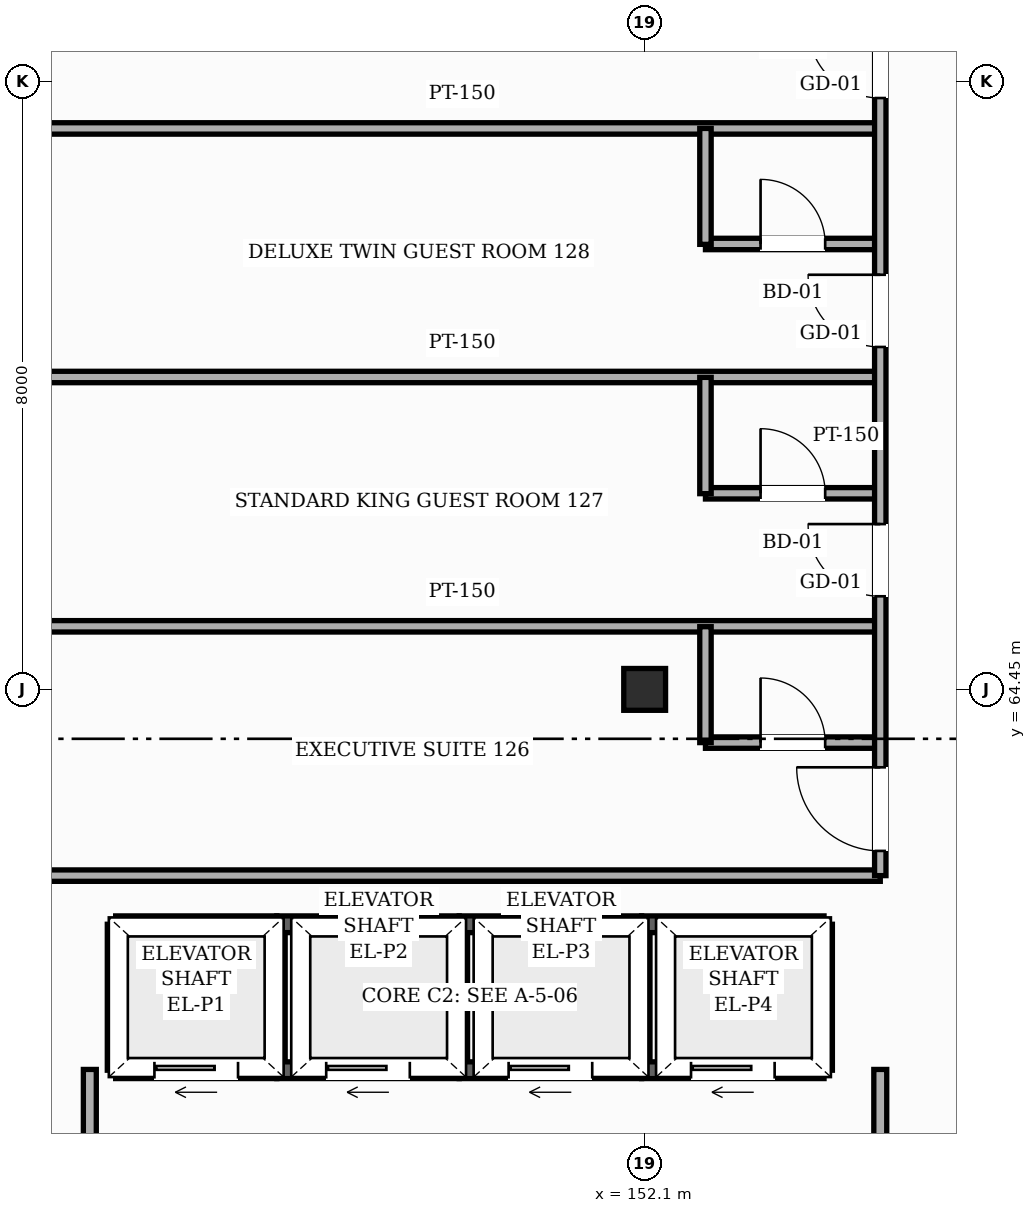
"""IFC4 building model, lengths in metres.
Left out: names, types, materials, properties, quantities, classifications, styles, units other than length and angle.
Written with IfcOpenShell. Run it as: python <this file> out.ifc"""

import sys

from ifc_helpers import new_model, si_unit, direction, frame, frame_2d, origin, origin_2d, place, context, subcontext, project, spatial, rectangle, hollow_rectangle, extrude, element, fill, save


model = new_model("IFC4")
c1 = context("Model", 3, precision=1e-05, world=origin(), true_north=direction((0.0, 1.0)))
c2 = subcontext(c1, "Body", "Model", "MODEL_VIEW")
j1 = project(units=[si_unit("LENGTHUNIT", "METRE"), si_unit("PLANEANGLEUNIT", "RADIAN")], contexts=[c1])
p1 = place(None, origin())
s1 = spatial("IfcSite", under=j1, at=p1, CompositionType="ELEMENT")
p2 = place(p1, origin())
s2 = spatial("IfcBuilding", under=s1, at=p2, CompositionType="ELEMENT")
p3 = place(p2, frame((0.0, 0.0, 28.2)))
s3 = spatial("IfcBuildingStorey", under=s2, at=p3, CompositionType="ELEMENT", Elevation=28.2)
p4 = place(p3, frame((152.1, 64.45, 0.0), z_axis=(0.0, 0.0, 1.0), x_axis=(1.0, 0.0, 0.0)))
e1 = element("IfcColumn", 1, at=p4, inside=s3, PredefinedType="COLUMN", context=c2, shape_type="SweptSolid", body=[
    extrude(hollow_rectangle(XDim=0.55, YDim=0.55, WallThickness=0.022, InnerFilletRadius=0.022, OuterFilletRadius=0.044, at=origin_2d()), origin(), (0.0, 0.0, 1.0), 3.6),
])
p5 = place(p3, frame((145.14, 61.36, 0.0), z_axis=(0.0, 0.0, 1.0), x_axis=(1.0, 0.0, 0.0)))
e2 = element("IfcWall", 2, at=p5, inside=s3, PredefinedType="SHEAR", context=c2, shape_type="SweptSolid", body=[
    extrude(rectangle(XDim=2.12, YDim=0.22, at=frame_2d((1.06, 0.0))), origin(), (0.0, 0.0, 1.0), 3.38),
])
p6 = place(p3, frame((145.14, 59.44, 0.0), z_axis=(0.0, 0.0, 1.0), x_axis=(1.0, 0.0, 0.0)))
e3 = element("IfcWall", 3, at=p6, inside=s3, PredefinedType="SHEAR", context=c2, shape_type="SweptSolid", body=[
    extrude(rectangle(XDim=2.12, YDim=0.22, at=frame_2d((1.06, 0.0))), origin(), (0.0, 0.0, 1.0), 3.38),
])
p7 = place(p6, frame((0.51, 0.0, 0.0)))
e4 = element("IfcOpeningElement", 4, at=p7, cuts=e3, PredefinedType="OPENING", context=c2, shape_type="SweptSolid", body=[
    extrude(rectangle(XDim=1.1, YDim=2.2, at=frame_2d((0.55, 1.1))), frame((0.0, 0.12, 0.0), z_axis=(0.0, -1.0, 0.0), x_axis=(1.0, 0.0, 0.0)), (0.0, 0.0, 1.0), 0.24),
])
for number, where, z_axis, x_axis in (
    (5, (147.26, 59.44, 0.0), (0.0, 0.0, 1.0), (0.0, 1.0, 0.0)),
    (6, (145.14, 59.44, 0.0), (0.0, 0.0, 1.0), (0.0, 1.0, 0.0)),
):
    element("IfcWall", number, at=place(p3, frame(where, z_axis=z_axis, x_axis=x_axis)), inside=s3, PredefinedType="SHEAR", context=c2, shape_type="SweptSolid", body=[
        extrude(rectangle(XDim=1.92, YDim=0.22, at=frame_2d((0.96, 0.0))), origin(), (0.0, 0.0, 1.0), 3.38),
    ])
p8 = place(p3, frame((147.26, 61.36, 0.0), z_axis=(0.0, 0.0, 1.0), x_axis=(1.0, 0.0, 0.0)))
e7 = element("IfcWall", 7, at=p8, inside=s3, PredefinedType="SHEAR", context=c2, shape_type="SweptSolid", body=[
    extrude(rectangle(XDim=2.4, YDim=0.22, at=frame_2d((1.2, 0.0))), origin(), (0.0, 0.0, 1.0), 3.38),
])
p9 = place(p3, frame((147.26, 59.44, 0.0), z_axis=(0.0, 0.0, 1.0), x_axis=(1.0, 0.0, 0.0)))
e8 = element("IfcWall", 8, at=p9, inside=s3, PredefinedType="SHEAR", context=c2, shape_type="SweptSolid", body=[
    extrude(rectangle(XDim=2.4, YDim=0.22, at=frame_2d((1.2, 0.0))), origin(), (0.0, 0.0, 1.0), 3.38),
])
p10 = place(p9, frame((0.65, 0.0, 0.0)))
e9 = element("IfcOpeningElement", 9, at=p10, cuts=e8, PredefinedType="OPENING", context=c2, shape_type="SweptSolid", body=[
    extrude(rectangle(XDim=1.1, YDim=2.2, at=frame_2d((0.55, 1.1))), frame((0.0, 0.12, 0.0), z_axis=(0.0, -1.0, 0.0), x_axis=(1.0, 0.0, 0.0)), (0.0, 0.0, 1.0), 0.24),
])
p11 = place(p3, frame((149.66, 59.44, 0.0), z_axis=(0.0, 0.0, 1.0), x_axis=(0.0, 1.0, 0.0)))
e10 = element("IfcWall", 10, at=p11, inside=s3, PredefinedType="SHEAR", context=c2, shape_type="SweptSolid", body=[
    extrude(rectangle(XDim=1.92, YDim=0.22, at=frame_2d((0.96, 0.0))), origin(), (0.0, 0.0, 1.0), 3.38),
])
p12 = place(p3, frame((149.66, 61.36, 0.0), z_axis=(0.0, 0.0, 1.0), x_axis=(1.0, 0.0, 0.0)))
e11 = element("IfcWall", 11, at=p12, inside=s3, PredefinedType="SHEAR", context=c2, shape_type="SweptSolid", body=[
    extrude(rectangle(XDim=2.4, YDim=0.22, at=frame_2d((1.2, 0.0))), origin(), (0.0, 0.0, 1.0), 3.38),
])
p13 = place(p3, frame((149.66, 59.44, 0.0), z_axis=(0.0, 0.0, 1.0), x_axis=(1.0, 0.0, 0.0)))
e12 = element("IfcWall", 12, at=p13, inside=s3, PredefinedType="SHEAR", context=c2, shape_type="SweptSolid", body=[
    extrude(rectangle(XDim=2.4, YDim=0.22, at=frame_2d((1.2, 0.0))), origin(), (0.0, 0.0, 1.0), 3.38),
])
p14 = place(p13, frame((0.65, 0.0, 0.0)))
e13 = element("IfcOpeningElement", 13, at=p14, cuts=e12, PredefinedType="OPENING", context=c2, shape_type="SweptSolid", body=[
    extrude(rectangle(XDim=1.1, YDim=2.2, at=frame_2d((0.55, 1.1))), frame((0.0, 0.12, 0.0), z_axis=(0.0, -1.0, 0.0), x_axis=(1.0, 0.0, 0.0)), (0.0, 0.0, 1.0), 0.24),
])
p15 = place(p3, frame((152.06, 59.44, 0.0), z_axis=(0.0, 0.0, 1.0), x_axis=(0.0, 1.0, 0.0)))
e14 = element("IfcWall", 14, at=p15, inside=s3, PredefinedType="SHEAR", context=c2, shape_type="SweptSolid", body=[
    extrude(rectangle(XDim=1.92, YDim=0.22, at=frame_2d((0.96, 0.0))), origin(), (0.0, 0.0, 1.0), 3.38),
])
p16 = place(p3, frame((152.06, 61.36, 0.0), z_axis=(0.0, 0.0, 1.0), x_axis=(1.0, 0.0, 0.0)))
e15 = element("IfcWall", 15, at=p16, inside=s3, PredefinedType="SHEAR", context=c2, shape_type="SweptSolid", body=[
    extrude(rectangle(XDim=2.4, YDim=0.22, at=frame_2d((1.2, 0.0))), origin(), (0.0, 0.0, 1.0), 3.38),
])
p17 = place(p3, frame((152.06, 59.44, 0.0), z_axis=(0.0, 0.0, 1.0), x_axis=(1.0, 0.0, 0.0)))
e16 = element("IfcWall", 16, at=p17, inside=s3, PredefinedType="SHEAR", context=c2, shape_type="SweptSolid", body=[
    extrude(rectangle(XDim=2.4, YDim=0.22, at=frame_2d((1.2, 0.0))), origin(), (0.0, 0.0, 1.0), 3.38),
])
p18 = place(p17, frame((0.65, 0.0, 0.0)))
e17 = element("IfcOpeningElement", 17, at=p18, cuts=e16, PredefinedType="OPENING", context=c2, shape_type="SweptSolid", body=[
    extrude(rectangle(XDim=1.1, YDim=2.2, at=frame_2d((0.55, 1.1))), frame((0.0, 0.12, 0.0), z_axis=(0.0, -1.0, 0.0), x_axis=(1.0, 0.0, 0.0)), (0.0, 0.0, 1.0), 0.24),
])
p19 = place(p3, frame((154.46, 59.44, 0.0), z_axis=(0.0, 0.0, 1.0), x_axis=(0.0, 1.0, 0.0)))
e18 = element("IfcWall", 18, at=p19, inside=s3, PredefinedType="SHEAR", context=c2, shape_type="SweptSolid", body=[
    extrude(rectangle(XDim=1.92, YDim=0.22, at=frame_2d((0.96, 0.0))), origin(), (0.0, 0.0, 1.0), 3.38),
])
p20 = place(p3, frame((144.2, 62.0, 0.0), z_axis=(0.0, 0.0, 1.0), x_axis=(1.0, 0.0, 0.0)))
e19 = element("IfcWall", 19, at=p20, inside=s3, PredefinedType="PARTITIONING", context=c2, shape_type="SweptSolid", body=[
    extrude(rectangle(XDim=11.0, YDim=0.15, at=frame_2d((5.5, 0.0))), origin(), (0.0, 0.0, 1.0), 3.365),
])
p21 = place(p3, frame((152.9, 63.75, 0.0), z_axis=(0.0, 0.0, 1.0), x_axis=(1.0, 0.0, 0.0)))
e20 = element("IfcWall", 20, at=p21, inside=s3, PredefinedType="PARTITIONING", context=c2, shape_type="SweptSolid", body=[
    extrude(rectangle(XDim=2.3, YDim=0.15, at=frame_2d((1.15, 0.0))), origin(), (0.0, 0.0, 1.0), 3.365),
])
p22 = place(p21, frame((0.725, 0.0, 0.0)))
e21 = element("IfcOpeningElement", 21, at=p22, cuts=e20, PredefinedType="OPENING", context=c2, shape_type="SweptSolid", body=[
    extrude(rectangle(XDim=0.85, YDim=2.1, at=frame_2d((0.425, 1.05))), frame((0.0, 0.085, 0.0), z_axis=(0.0, -1.0, 0.0), x_axis=(1.0, 0.0, 0.0)), (0.0, 0.0, 1.0), 0.17),
])
p23 = place(p3, frame((144.2, 65.28, 0.0), z_axis=(0.0, 0.0, 1.0), x_axis=(1.0, 0.0, 0.0)))
e22 = element("IfcWall", 22, at=p23, inside=s3, PredefinedType="PARTITIONING", context=c2, shape_type="SweptSolid", body=[
    extrude(rectangle(XDim=11.0, YDim=0.15, at=frame_2d((5.5, 0.0))), origin(), (0.0, 0.0, 1.0), 3.365),
])
p24 = place(p3, frame((152.9, 67.03, 0.0), z_axis=(0.0, 0.0, 1.0), x_axis=(1.0, 0.0, 0.0)))
e23 = element("IfcWall", 23, at=p24, inside=s3, PredefinedType="PARTITIONING", context=c2, shape_type="SweptSolid", body=[
    extrude(rectangle(XDim=2.3, YDim=0.15, at=frame_2d((1.15, 0.0))), origin(), (0.0, 0.0, 1.0), 3.365),
])
p25 = place(p24, frame((0.725, 0.0, 0.0)))
e24 = element("IfcOpeningElement", 24, at=p25, cuts=e23, PredefinedType="OPENING", context=c2, shape_type="SweptSolid", body=[
    extrude(rectangle(XDim=0.85, YDim=2.1, at=frame_2d((0.425, 1.05))), frame((0.0, 0.085, 0.0), z_axis=(0.0, -1.0, 0.0), x_axis=(1.0, 0.0, 0.0)), (0.0, 0.0, 1.0), 0.17),
])
p26 = place(p3, frame((144.2, 68.56, 0.0), z_axis=(0.0, 0.0, 1.0), x_axis=(1.0, 0.0, 0.0)))
e25 = element("IfcWall", 25, at=p26, inside=s3, PredefinedType="PARTITIONING", context=c2, shape_type="SweptSolid", body=[
    extrude(rectangle(XDim=11.0, YDim=0.15, at=frame_2d((5.5, 0.0))), origin(), (0.0, 0.0, 1.0), 3.365),
])
p27 = place(p3, frame((152.9, 70.31, 0.0), z_axis=(0.0, 0.0, 1.0), x_axis=(1.0, 0.0, 0.0)))
e26 = element("IfcWall", 26, at=p27, inside=s3, PredefinedType="PARTITIONING", context=c2, shape_type="SweptSolid", body=[
    extrude(rectangle(XDim=2.3, YDim=0.15, at=frame_2d((1.15, 0.0))), origin(), (0.0, 0.0, 1.0), 3.365),
])
p28 = place(p27, frame((0.725, 0.0, 0.0)))
e27 = element("IfcOpeningElement", 27, at=p28, cuts=e26, PredefinedType="OPENING", context=c2, shape_type="SweptSolid", body=[
    extrude(rectangle(XDim=0.85, YDim=2.1, at=frame_2d((0.425, 1.05))), frame((0.0, 0.085, 0.0), z_axis=(0.0, -1.0, 0.0), x_axis=(1.0, 0.0, 0.0)), (0.0, 0.0, 1.0), 0.17),
])
p29 = place(p3, frame((144.2, 71.83, 0.0), z_axis=(0.0, 0.0, 1.0), x_axis=(1.0, 0.0, 0.0)))
e28 = element("IfcWall", 28, at=p29, inside=s3, PredefinedType="PARTITIONING", context=c2, shape_type="SweptSolid", body=[
    extrude(rectangle(XDim=11.0, YDim=0.15, at=frame_2d((5.5, 0.0))), origin(), (0.0, 0.0, 1.0), 3.365),
])
p30 = place(p3, frame((144.8, 53.0, 0.0), z_axis=(0.0, 0.0, 1.0), x_axis=(0.0, 1.0, 0.0)))
e29 = element("IfcWall", 29, at=p30, inside=s3, PredefinedType="PARTITIONING", context=c2, shape_type="SweptSolid", body=[
    extrude(rectangle(XDim=6.45, YDim=0.17, at=frame_2d((3.225, 0.0))), origin(), (0.0, 0.0, 1.0), 3.365),
])
p31 = place(p3, frame((152.9, 63.75, 0.0), z_axis=(0.0, 0.0, 1.0), x_axis=(0.0, 1.0, 0.0)))
e30 = element("IfcWall", 30, at=p31, inside=s3, PredefinedType="PARTITIONING", context=c2, shape_type="SweptSolid", body=[
    extrude(rectangle(XDim=1.525, YDim=0.15, at=frame_2d((0.762, 0.0))), origin(), (0.0, 0.0, 1.0), 3.365),
])
p32 = place(p3, frame((152.9, 67.025, 0.0), z_axis=(0.0, 0.0, 1.0), x_axis=(0.0, 1.0, 0.0)))
e31 = element("IfcWall", 31, at=p32, inside=s3, PredefinedType="PARTITIONING", context=c2, shape_type="SweptSolid", body=[
    extrude(rectangle(XDim=1.53, YDim=0.15, at=frame_2d((0.765, 0.0))), origin(), (0.0, 0.0, 1.0), 3.365),
])
p33 = place(p3, frame((152.9, 70.305, 0.0), z_axis=(0.0, 0.0, 1.0), x_axis=(0.0, 1.0, 0.0)))
e32 = element("IfcWall", 32, at=p33, inside=s3, PredefinedType="PARTITIONING", context=c2, shape_type="SweptSolid", body=[
    extrude(rectangle(XDim=1.525, YDim=0.15, at=frame_2d((0.763, 0.0))), origin(), (0.0, 0.0, 1.0), 3.365),
])
p34 = place(p3, frame((155.2, 53.0, 0.0), z_axis=(0.0, 0.0, 1.0), x_axis=(0.0, 1.0, 0.0)))
e33 = element("IfcWall", 33, at=p34, inside=s3, PredefinedType="PARTITIONING", context=c2, shape_type="SweptSolid", body=[
    extrude(rectangle(XDim=6.45, YDim=0.17, at=frame_2d((3.225, 0.0))), origin(), (0.0, 0.0, 1.0), 3.365),
])
p35 = place(p34, frame((2.625, 0.0, 0.0)))
e34 = element("IfcOpeningElement", 34, at=p35, cuts=e33, PredefinedType="OPENING", context=c2, shape_type="SweptSolid", body=[
    extrude(rectangle(XDim=1.2, YDim=2.2, at=frame_2d((0.6, 1.1))), frame((0.0, 0.095, 0.0), z_axis=(0.0, -1.0, 0.0), x_axis=(1.0, 0.0, 0.0)), (0.0, 0.0, 1.0), 0.19),
])
p36 = place(p3, frame((155.2, 62.0, 0.0), z_axis=(0.0, 0.0, 1.0), x_axis=(0.0, 1.0, 0.0)))
e35 = element("IfcWall", 35, at=p36, inside=s3, PredefinedType="PARTITIONING", context=c2, shape_type="SweptSolid", body=[
    extrude(rectangle(XDim=42.6, YDim=0.15, at=frame_2d((21.3, 0.0))), origin(), (0.0, 0.0, 1.0), 3.365),
])
p37 = place(p36, frame((0.325, 0.0, 0.0)))
e36 = element("IfcOpeningElement", 36, at=p37, cuts=e35, PredefinedType="OPENING", context=c2, shape_type="SweptSolid", body=[
    extrude(rectangle(XDim=1.1, YDim=2.2, at=frame_2d((0.55, 1.1))), frame((0.0, 0.085, 0.0), z_axis=(0.0, -1.0, 0.0), x_axis=(1.0, 0.0, 0.0)), (0.0, 0.0, 1.0), 0.17),
])
p38 = place(p36, frame((3.675, 0.0, 0.0)))
e37 = element("IfcOpeningElement", 37, at=p38, cuts=e35, PredefinedType="OPENING", context=c2, shape_type="SweptSolid", body=[
    extrude(rectangle(XDim=0.95, YDim=2.15, at=frame_2d((0.475, 1.075))), frame((0.0, 0.085, 0.0), z_axis=(0.0, -1.0, 0.0), x_axis=(1.0, 0.0, 0.0)), (0.0, 0.0, 1.0), 0.17),
])
p39 = place(p36, frame((6.955, 0.0, 0.0)))
e38 = element("IfcOpeningElement", 38, at=p39, cuts=e35, PredefinedType="OPENING", context=c2, shape_type="SweptSolid", body=[
    extrude(rectangle(XDim=0.95, YDim=2.15, at=frame_2d((0.475, 1.075))), frame((0.0, 0.085, 0.0), z_axis=(0.0, -1.0, 0.0), x_axis=(1.0, 0.0, 0.0)), (0.0, 0.0, 1.0), 0.17),
])
p40 = place(p36, frame((10.23, 0.0, 0.0)))
e39 = element("IfcOpeningElement", 39, at=p40, cuts=e35, PredefinedType="OPENING", context=c2, shape_type="SweptSolid", body=[
    extrude(rectangle(XDim=0.95, YDim=2.15, at=frame_2d((0.475, 1.075))), frame((0.0, 0.085, 0.0), z_axis=(0.0, -1.0, 0.0), x_axis=(1.0, 0.0, 0.0)), (0.0, 0.0, 1.0), 0.17),
])
p41 = place(p36, frame((13.51, 0.0, 0.0)))
e40 = element("IfcOpeningElement", 40, at=p41, cuts=e35, PredefinedType="OPENING", context=c2, shape_type="SweptSolid", body=[
    extrude(rectangle(XDim=0.95, YDim=2.15, at=frame_2d((0.475, 1.075))), frame((0.0, 0.085, 0.0), z_axis=(0.0, -1.0, 0.0), x_axis=(1.0, 0.0, 0.0)), (0.0, 0.0, 1.0), 0.17),
])
p42 = place(p36, frame((16.785, 0.0, 0.0)))
e41 = element("IfcOpeningElement", 41, at=p42, cuts=e35, PredefinedType="OPENING", context=c2, shape_type="SweptSolid", body=[
    extrude(rectangle(XDim=0.95, YDim=2.15, at=frame_2d((0.475, 1.075))), frame((0.0, 0.085, 0.0), z_axis=(0.0, -1.0, 0.0), x_axis=(1.0, 0.0, 0.0)), (0.0, 0.0, 1.0), 0.17),
])
p43 = place(p36, frame((20.06, 0.0, 0.0)))
e42 = element("IfcOpeningElement", 42, at=p43, cuts=e35, PredefinedType="OPENING", context=c2, shape_type="SweptSolid", body=[
    extrude(rectangle(XDim=0.95, YDim=2.15, at=frame_2d((0.475, 1.075))), frame((0.0, 0.085, 0.0), z_axis=(0.0, -1.0, 0.0), x_axis=(1.0, 0.0, 0.0)), (0.0, 0.0, 1.0), 0.17),
])
p44 = place(p36, frame((23.34, 0.0, 0.0)))
e43 = element("IfcOpeningElement", 43, at=p44, cuts=e35, PredefinedType="OPENING", context=c2, shape_type="SweptSolid", body=[
    extrude(rectangle(XDim=0.95, YDim=2.15, at=frame_2d((0.475, 1.075))), frame((0.0, 0.085, 0.0), z_axis=(0.0, -1.0, 0.0), x_axis=(1.0, 0.0, 0.0)), (0.0, 0.0, 1.0), 0.17),
])
p45 = place(p36, frame((26.615, 0.0, 0.0)))
e44 = element("IfcOpeningElement", 44, at=p45, cuts=e35, PredefinedType="OPENING", context=c2, shape_type="SweptSolid", body=[
    extrude(rectangle(XDim=0.95, YDim=2.15, at=frame_2d((0.475, 1.075))), frame((0.0, 0.085, 0.0), z_axis=(0.0, -1.0, 0.0), x_axis=(1.0, 0.0, 0.0)), (0.0, 0.0, 1.0), 0.17),
])
p46 = place(p36, frame((29.89, 0.0, 0.0)))
e45 = element("IfcOpeningElement", 45, at=p46, cuts=e35, PredefinedType="OPENING", context=c2, shape_type="SweptSolid", body=[
    extrude(rectangle(XDim=0.95, YDim=2.15, at=frame_2d((0.475, 1.075))), frame((0.0, 0.085, 0.0), z_axis=(0.0, -1.0, 0.0), x_axis=(1.0, 0.0, 0.0)), (0.0, 0.0, 1.0), 0.17),
])
p47 = place(p36, frame((33.17, 0.0, 0.0)))
e46 = element("IfcOpeningElement", 46, at=p47, cuts=e35, PredefinedType="OPENING", context=c2, shape_type="SweptSolid", body=[
    extrude(rectangle(XDim=0.95, YDim=2.15, at=frame_2d((0.475, 1.075))), frame((0.0, 0.085, 0.0), z_axis=(0.0, -1.0, 0.0), x_axis=(1.0, 0.0, 0.0)), (0.0, 0.0, 1.0), 0.17),
])
p48 = place(p36, frame((36.445, 0.0, 0.0)))
e47 = element("IfcOpeningElement", 47, at=p48, cuts=e35, PredefinedType="OPENING", context=c2, shape_type="SweptSolid", body=[
    extrude(rectangle(XDim=0.95, YDim=2.15, at=frame_2d((0.475, 1.075))), frame((0.0, 0.085, 0.0), z_axis=(0.0, -1.0, 0.0), x_axis=(1.0, 0.0, 0.0)), (0.0, 0.0, 1.0), 0.17),
])
p49 = place(p36, frame((39.725, 0.0, 0.0)))
e48 = element("IfcOpeningElement", 48, at=p49, cuts=e35, PredefinedType="OPENING", context=c2, shape_type="SweptSolid", body=[
    extrude(rectangle(XDim=0.95, YDim=2.15, at=frame_2d((0.475, 1.075))), frame((0.0, 0.085, 0.0), z_axis=(0.0, -1.0, 0.0), x_axis=(1.0, 0.0, 0.0)), (0.0, 0.0, 1.0), 0.17),
])
p50 = place(p7, origin())
e49 = element("IfcDoor", 49, at=p50, inside=s3, OperationType="SLIDING_TO_LEFT", PredefinedType="DOOR", context=c2, shape_type="SweptSolid", body=[
    extrude(rectangle(XDim=1.1, YDim=2.2, at=frame_2d((0.55, 1.1))), frame((0.0, 0.025, 0.0), z_axis=(0.0, -1.0, 0.0), x_axis=(1.0, 0.0, 0.0)), (0.0, 0.0, 1.0), 0.05),
])
fill(e4, e49)
p51 = place(p10, origin())
e50 = element("IfcDoor", 50, at=p51, inside=s3, OperationType="SLIDING_TO_LEFT", PredefinedType="DOOR", context=c2, shape_type="SweptSolid", body=[
    extrude(rectangle(XDim=1.1, YDim=2.2, at=frame_2d((0.55, 1.1))), frame((0.0, 0.025, 0.0), z_axis=(0.0, -1.0, 0.0), x_axis=(1.0, 0.0, 0.0)), (0.0, 0.0, 1.0), 0.05),
])
fill(e9, e50)
p52 = place(p14, origin())
e51 = element("IfcDoor", 51, at=p52, inside=s3, OperationType="SLIDING_TO_LEFT", PredefinedType="DOOR", context=c2, shape_type="SweptSolid", body=[
    extrude(rectangle(XDim=1.1, YDim=2.2, at=frame_2d((0.55, 1.1))), frame((0.0, 0.025, 0.0), z_axis=(0.0, -1.0, 0.0), x_axis=(1.0, 0.0, 0.0)), (0.0, 0.0, 1.0), 0.05),
])
fill(e13, e51)
p53 = place(p18, origin())
e52 = element("IfcDoor", 52, at=p53, inside=s3, OperationType="SLIDING_TO_LEFT", PredefinedType="DOOR", context=c2, shape_type="SweptSolid", body=[
    extrude(rectangle(XDim=1.1, YDim=2.2, at=frame_2d((0.55, 1.1))), frame((0.0, 0.025, 0.0), z_axis=(0.0, -1.0, 0.0), x_axis=(1.0, 0.0, 0.0)), (0.0, 0.0, 1.0), 0.05),
])
fill(e17, e52)
p54 = place(p37, origin())
e53 = element("IfcDoor", 53, at=p54, inside=s3, OperationType="SINGLE_SWING_RIGHT", PredefinedType="DOOR", context=c2, shape_type="SweptSolid", body=[
    extrude(rectangle(XDim=1.1, YDim=2.2, at=frame_2d((0.55, 1.1))), frame((0.0, 0.025, 0.0), z_axis=(0.0, -1.0, 0.0), x_axis=(1.0, 0.0, 0.0)), (0.0, 0.0, 1.0), 0.05),
])
fill(e36, e53)
p55 = place(p22, origin())
e54 = element("IfcDoor", 54, at=p55, inside=s3, OperationType="SINGLE_SWING_LEFT", PredefinedType="DOOR", context=c2, shape_type="SweptSolid", body=[
    extrude(rectangle(XDim=0.85, YDim=2.1, at=frame_2d((0.425, 1.05))), frame((0.0, 0.025, 0.0), z_axis=(0.0, -1.0, 0.0), x_axis=(1.0, 0.0, 0.0)), (0.0, 0.0, 1.0), 0.05),
])
fill(e21, e54)
p56 = place(p38, origin())
e55 = element("IfcDoor", 55, at=p56, inside=s3, OperationType="SINGLE_SWING_RIGHT", PredefinedType="DOOR", context=c2, shape_type="SweptSolid", body=[
    extrude(rectangle(XDim=0.95, YDim=2.15, at=frame_2d((0.475, 1.075))), frame((0.0, 0.025, 0.0), z_axis=(0.0, -1.0, 0.0), x_axis=(1.0, 0.0, 0.0)), (0.0, 0.0, 1.0), 0.05),
])
fill(e37, e55)
p57 = place(p25, origin())
e56 = element("IfcDoor", 56, at=p57, inside=s3, OperationType="SINGLE_SWING_LEFT", PredefinedType="DOOR", context=c2, shape_type="SweptSolid", body=[
    extrude(rectangle(XDim=0.85, YDim=2.1, at=frame_2d((0.425, 1.05))), frame((0.0, 0.025, 0.0), z_axis=(0.0, -1.0, 0.0), x_axis=(1.0, 0.0, 0.0)), (0.0, 0.0, 1.0), 0.05),
])
fill(e24, e56)
p58 = place(p39, origin())
e57 = element("IfcDoor", 57, at=p58, inside=s3, OperationType="SINGLE_SWING_RIGHT", PredefinedType="DOOR", context=c2, shape_type="SweptSolid", body=[
    extrude(rectangle(XDim=0.95, YDim=2.15, at=frame_2d((0.475, 1.075))), frame((0.0, 0.025, 0.0), z_axis=(0.0, -1.0, 0.0), x_axis=(1.0, 0.0, 0.0)), (0.0, 0.0, 1.0), 0.05),
])
fill(e38, e57)
p59 = place(p28, origin())
e58 = element("IfcDoor", 58, at=p59, inside=s3, OperationType="SINGLE_SWING_LEFT", PredefinedType="DOOR", context=c2, shape_type="SweptSolid", body=[
    extrude(rectangle(XDim=0.85, YDim=2.1, at=frame_2d((0.425, 1.05))), frame((0.0, 0.025, 0.0), z_axis=(0.0, -1.0, 0.0), x_axis=(1.0, 0.0, 0.0)), (0.0, 0.0, 1.0), 0.05),
])
fill(e27, e58)
p60 = place(p40, origin())
e59 = element("IfcDoor", 59, at=p60, inside=s3, OperationType="SINGLE_SWING_RIGHT", PredefinedType="DOOR", context=c2, shape_type="SweptSolid", body=[
    extrude(rectangle(XDim=0.95, YDim=2.15, at=frame_2d((0.475, 1.075))), frame((0.0, 0.025, 0.0), z_axis=(0.0, -1.0, 0.0), x_axis=(1.0, 0.0, 0.0)), (0.0, 0.0, 1.0), 0.05),
])
fill(e39, e59)
save(model, sys.argv[1])
